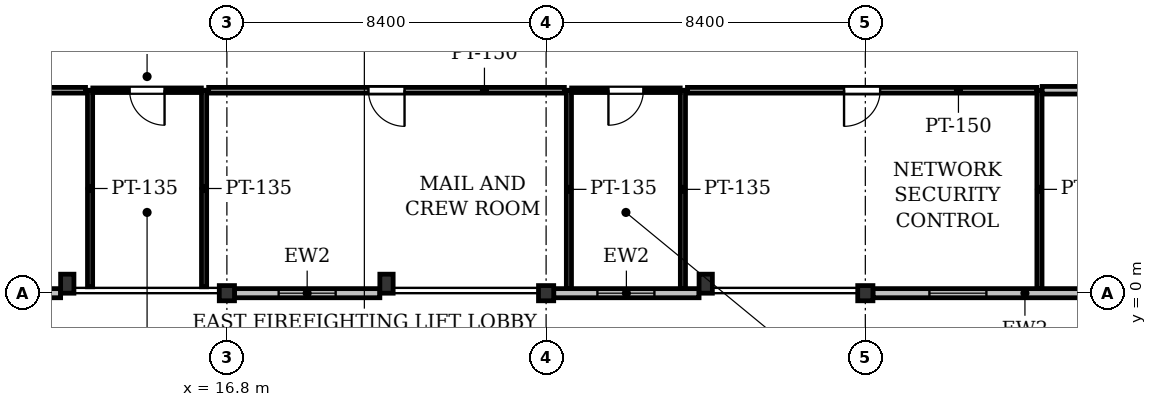
"""IFC4 building model, lengths in metres.
Left out: names, types, materials, properties, quantities, classifications, styles, units other than length and angle.
Written with IfcOpenShell. Run it as: python <this file> out.ifc"""

import sys

from ifc_helpers import new_model, si_unit, direction, frame, frame_2d, origin, origin_2d, place, context, subcontext, project, spatial, rectangle, i_section, extrude, element, fill, save


model = new_model("IFC4")
c1 = context("Model", 3, precision=1e-05, world=origin(), true_north=direction((0.0, 1.0)))
c2 = subcontext(c1, "Body", "Model", "MODEL_VIEW")
j1 = project(units=[si_unit("LENGTHUNIT", "METRE"), si_unit("PLANEANGLEUNIT", "RADIAN")], contexts=[c1])
p1 = place(None, origin())
s1 = spatial("IfcSite", under=j1, at=p1, CompositionType="ELEMENT")
p2 = place(p1, origin())
s2 = spatial("IfcBuilding", under=s1, at=p2, CompositionType="ELEMENT")
p3 = place(p2, frame((0.0, 0.0, 84.4)))
s3 = spatial("IfcBuildingStorey", under=s2, at=p3, CompositionType="ELEMENT", Elevation=84.4)
for number, where, z_axis, x_axis in (
    (1, (16.8, 0.0, 0.0), (0.0, 0.0, 1.0), (1.0, 0.0, 0.0)),
    (2, (25.2, 0.0, 0.0), (0.0, 0.0, 1.0), (1.0, 0.0, 0.0)),
    (3, (33.6, 0.0, 0.0), (0.0, 0.0, 1.0), (1.0, 0.0, 0.0)),
):
    element("IfcColumn", number, at=place(p3, frame(where, z_axis=z_axis, x_axis=x_axis)), inside=s3, PredefinedType="COLUMN", context=c2, shape_type="SweptSolid", body=[
        extrude(i_section(OverallWidth=0.4, OverallDepth=0.4, WebThickness=0.025, FlangeThickness=0.04, at=origin_2d()), origin(), (0.0, 0.0, 1.0), 4.1),
    ])
for number, where, z_axis, x_axis in (
    (4, (12.6, 0.25, 0.0), (0.0, 0.0, 1.0), (1.0, 0.0, 0.0)),
    (5, (21.0, 0.25, 0.0), (0.0, 0.0, 1.0), (1.0, 0.0, 0.0)),
    (6, (29.4, 0.25, 0.0), (0.0, 0.0, 1.0), (1.0, 0.0, 0.0)),
):
    element("IfcColumn", number, at=place(p3, frame(where, z_axis=z_axis, x_axis=x_axis)), inside=s3, PredefinedType="PILASTER", context=c2, shape_type="SweptSolid", body=[
        extrude(rectangle(XDim=0.35, YDim=0.5, at=origin_2d()), origin(), (0.0, 0.0, 1.0), 4.1),
    ])
p4 = place(p3, frame((41.8, 0.0, 0.0), z_axis=(0.0, 0.0, 1.0), x_axis=(-1.0, 0.0, 0.0)))
e7 = element("IfcWall", 7, at=p4, inside=s3, PredefinedType="STANDARD", context=c2, shape_type="SweptSolid", body=[
    extrude(rectangle(XDim=8.0, YDim=0.24, at=frame_2d((4.0, 0.0))), origin(), (0.0, 0.0, 1.0), 3.422),
])
p5 = place(p4, frame((5.014, 0.0, 0.9)))
e8 = element("IfcOpeningElement", 8, at=p5, cuts=e7, PredefinedType="OPENING", context=c2, shape_type="SweptSolid", body=[
    extrude(rectangle(XDim=1.5, YDim=1.6, at=frame_2d((0.75, 0.8))), frame((0.0, 0.13, 0.0), z_axis=(0.0, -1.0, 0.0), x_axis=(1.0, 0.0, 0.0)), (0.0, 0.0, 1.0), 0.26),
])
p6 = place(p3, frame((29.225, 0.0, 0.0), z_axis=(0.0, 0.0, 1.0), x_axis=(-1.0, 0.0, 0.0)))
e9 = element("IfcWall", 9, at=p6, inside=s3, PredefinedType="STANDARD", context=c2, shape_type="SweptSolid", body=[
    extrude(rectangle(XDim=3.825, YDim=0.24, at=frame_2d((1.913, 0.0))), origin(), (0.0, 0.0, 1.0), 3.422),
])
p7 = place(p6, frame((1.175, 0.0, 0.9)))
e10 = element("IfcOpeningElement", 10, at=p7, cuts=e9, PredefinedType="OPENING", context=c2, shape_type="SweptSolid", body=[
    extrude(rectangle(XDim=1.5, YDim=1.6, at=frame_2d((0.75, 0.8))), frame((0.0, 0.13, 0.0), z_axis=(0.0, -1.0, 0.0), x_axis=(1.0, 0.0, 0.0)), (0.0, 0.0, 1.0), 0.26),
])
p8 = place(p3, frame((20.825, 0.0, 0.0), z_axis=(0.0, 0.0, 1.0), x_axis=(-1.0, 0.0, 0.0)))
e11 = element("IfcWall", 11, at=p8, inside=s3, PredefinedType="STANDARD", context=c2, shape_type="SweptSolid", body=[
    extrude(rectangle(XDim=3.825, YDim=0.24, at=frame_2d((1.913, 0.0))), origin(), (0.0, 0.0, 1.0), 3.422),
])
p9 = place(p8, frame((1.163, 0.0, 0.9)))
e12 = element("IfcOpeningElement", 12, at=p9, cuts=e11, PredefinedType="OPENING", context=c2, shape_type="SweptSolid", body=[
    extrude(rectangle(XDim=1.5, YDim=1.6, at=frame_2d((0.75, 0.8))), frame((0.0, 0.13, 0.0), z_axis=(0.0, -1.0, 0.0), x_axis=(1.0, 0.0, 0.0)), (0.0, 0.0, 1.0), 0.26),
])
p10 = place(p3, frame((12.425, 0.0, 0.0), z_axis=(0.0, 0.0, 1.0), x_axis=(-1.0, 0.0, 0.0)))
e13 = element("IfcWall", 13, at=p10, inside=s3, PredefinedType="STANDARD", context=c2, shape_type="SweptSolid", body=[
    extrude(rectangle(XDim=3.825, YDim=0.24, at=frame_2d((1.913, 0.0))), origin(), (0.0, 0.0, 1.0), 3.422),
])
p11 = place(p10, frame((1.163, 0.0, 0.9)))
e14 = element("IfcOpeningElement", 14, at=p11, cuts=e13, PredefinedType="OPENING", context=c2, shape_type="SweptSolid", body=[
    extrude(rectangle(XDim=1.5, YDim=1.6, at=frame_2d((0.75, 0.8))), frame((0.0, 0.13, 0.0), z_axis=(0.0, -1.0, 0.0), x_axis=(1.0, 0.0, 0.0)), (0.0, 0.0, 1.0), 0.26),
])
for number, where, z_axis, x_axis in (
    (15, (13.2, 5.34, 0.0), (0.0, 0.0, 1.0), (0.0, -1.0, 0.0)),
    (16, (16.2, 0.169, 0.0), (0.0, 0.0, 1.0), (0.0, 1.0, 0.0)),
):
    element("IfcWall", number, at=place(p3, frame(where, z_axis=z_axis, x_axis=x_axis)), inside=s3, PredefinedType="PARTITIONING", context=c2, shape_type="SweptSolid", body=[
        extrude(rectangle(XDim=5.171, YDim=0.135, at=frame_2d((2.585, 0.0))), origin(), (0.0, 0.0, 1.0), 3.825),
    ])
p12 = place(p3, frame((16.128, 5.34, 0.0), z_axis=(0.0, 0.0, 1.0), x_axis=(-1.0, 0.0, 0.0)))
e17 = element("IfcWall", 17, at=p12, inside=s3, PredefinedType="PARTITIONING", context=c2, shape_type="SweptSolid", body=[
    extrude(rectangle(XDim=2.857, YDim=0.12, at=frame_2d((1.428, 0.0))), origin(), (0.0, 0.0, 1.0), 3.825),
])
p13 = place(p12, frame((0.969, 0.0, 0.0)))
e18 = element("IfcOpeningElement", 18, at=p13, cuts=e17, PredefinedType="OPENING", context=c2, shape_type="SweptSolid", body=[
    extrude(rectangle(XDim=0.92, YDim=2.1, at=frame_2d((0.46, 1.05))), frame((0.0, 0.07, 0.0), z_axis=(0.0, -1.0, 0.0), x_axis=(1.0, 0.0, 0.0)), (0.0, 0.0, 1.0), 0.14),
])
for number, where, z_axis, x_axis in (
    (19, (25.8, 5.34, 0.0), (0.0, 0.0, 1.0), (0.0, -1.0, 0.0)),
    (20, (28.8, 0.124, 0.0), (0.0, 0.0, 1.0), (0.0, 1.0, 0.0)),
):
    element("IfcWall", number, at=place(p3, frame(where, z_axis=z_axis, x_axis=x_axis)), inside=s3, PredefinedType="PARTITIONING", context=c2, shape_type="SweptSolid", body=[
        extrude(rectangle(XDim=5.216, YDim=0.135, at=frame_2d((2.608, 0.0))), origin(), (0.0, 0.0, 1.0), 3.825),
    ])
p14 = place(p3, frame((28.729, 5.34, 0.0), z_axis=(0.0, 0.0, 1.0), x_axis=(-1.0, 0.0, 0.0)))
e21 = element("IfcWall", 21, at=p14, inside=s3, PredefinedType="PARTITIONING", context=c2, shape_type="SweptSolid", body=[
    extrude(rectangle(XDim=2.857, YDim=0.12, at=frame_2d((1.428, 0.0))), origin(), (0.0, 0.0, 1.0), 3.825),
])
p15 = place(p14, frame((0.969, 0.0, 0.0)))
e22 = element("IfcOpeningElement", 22, at=p15, cuts=e21, PredefinedType="OPENING", context=c2, shape_type="SweptSolid", body=[
    extrude(rectangle(XDim=0.92, YDim=2.1, at=frame_2d((0.46, 1.05))), frame((0.0, 0.07, 0.0), z_axis=(0.0, -1.0, 0.0), x_axis=(1.0, 0.0, 0.0)), (0.0, 0.0, 1.0), 0.14),
])
p16 = place(p3, frame((38.182, 0.124, 0.0), z_axis=(0.0, 0.0, 1.0), x_axis=(0.0, 1.0, 0.0)))
e23 = element("IfcWall", 23, at=p16, inside=s3, PredefinedType="PARTITIONING", context=c2, shape_type="SweptSolid", body=[
    extrude(rectangle(XDim=5.216, YDim=0.135, at=frame_2d((2.608, 0.0))), origin(), (0.0, 0.0, 1.0), 3.825),
])
p17 = place(p3, frame((38.111, 5.34, 0.0), z_axis=(0.0, 0.0, 1.0), x_axis=(-1.0, 0.0, 0.0)))
e24 = element("IfcWall", 24, at=p17, inside=s3, PredefinedType="PARTITIONING", context=c2, shape_type="SweptSolid", body=[
    extrude(rectangle(XDim=9.191, YDim=0.15, at=frame_2d((4.595, 0.0))), origin(), (0.0, 0.0, 1.0), 3.297),
])
p18 = place(p17, frame((4.12, 0.0, 0.0)))
e25 = element("IfcOpeningElement", 25, at=p18, cuts=e24, PredefinedType="OPENING", context=c2, shape_type="SweptSolid", body=[
    extrude(rectangle(XDim=0.95, YDim=2.15, at=frame_2d((0.475, 1.075))), frame((0.0, 0.085, 0.0), z_axis=(0.0, -1.0, 0.0), x_axis=(1.0, 0.0, 0.0)), (0.0, 0.0, 1.0), 0.17),
])
p19 = place(p3, frame((25.68, 5.34, 0.0), z_axis=(0.0, 0.0, 1.0), x_axis=(-1.0, 0.0, 0.0)))
e26 = element("IfcWall", 26, at=p19, inside=s3, PredefinedType="PARTITIONING", context=c2, shape_type="SweptSolid", body=[
    extrude(rectangle(XDim=9.36, YDim=0.15, at=frame_2d((4.68, 0.0))), origin(), (0.0, 0.0, 1.0), 3.297),
])
p20 = place(p19, frame((4.205, 0.0, 0.0)))
e27 = element("IfcOpeningElement", 27, at=p20, cuts=e26, PredefinedType="OPENING", context=c2, shape_type="SweptSolid", body=[
    extrude(rectangle(XDim=0.95, YDim=2.15, at=frame_2d((0.475, 1.075))), frame((0.0, 0.085, 0.0), z_axis=(0.0, -1.0, 0.0), x_axis=(1.0, 0.0, 0.0)), (0.0, 0.0, 1.0), 0.17),
])
p21 = place(p3, frame((45.2, 5.34, 0.0), z_axis=(0.0, 0.0, 1.0), x_axis=(-1.0, 0.0, 0.0)))
e28 = element("IfcWall", 28, at=p21, inside=s3, PredefinedType="PARTITIONING", context=c2, shape_type="SweptSolid", body=[
    extrude(rectangle(XDim=6.947, YDim=0.2, at=frame_2d((3.473, 0.0))), origin(), (0.0, 0.0, 1.0), 3.297),
])
p22 = place(p3, frame((13.08, 5.34, 0.0), z_axis=(0.0, 0.0, 1.0), x_axis=(-1.0, 0.0, 0.0)))
e29 = element("IfcWall", 29, at=p22, inside=s3, PredefinedType="PARTITIONING", context=c2, shape_type="SweptSolid", body=[
    extrude(rectangle(XDim=7.68, YDim=0.15, at=frame_2d((3.84, 0.0))), origin(), (0.0, 0.0, 1.0), 3.297),
])
p23 = place(p5, origin())
e30 = element("IfcWindow", 30, at=p23, inside=s3, PartitioningType="SINGLE_PANEL", PredefinedType="WINDOW", context=c2, shape_type="SweptSolid", body=[
    extrude(rectangle(XDim=1.5, YDim=1.6, at=frame_2d((0.75, 0.8))), frame((0.0, 0.03, 0.0), z_axis=(0.0, -1.0, 0.0), x_axis=(1.0, 0.0, 0.0)), (0.0, 0.0, 1.0), 0.06),
])
fill(e8, e30)
p24 = place(p7, origin())
e31 = element("IfcWindow", 31, at=p24, inside=s3, PartitioningType="SINGLE_PANEL", PredefinedType="WINDOW", context=c2, shape_type="SweptSolid", body=[
    extrude(rectangle(XDim=1.5, YDim=1.6, at=frame_2d((0.75, 0.8))), frame((0.0, 0.03, 0.0), z_axis=(0.0, -1.0, 0.0), x_axis=(1.0, 0.0, 0.0)), (0.0, 0.0, 1.0), 0.06),
])
fill(e10, e31)
p25 = place(p9, origin())
e32 = element("IfcWindow", 32, at=p25, inside=s3, PartitioningType="SINGLE_PANEL", PredefinedType="WINDOW", context=c2, shape_type="SweptSolid", body=[
    extrude(rectangle(XDim=1.5, YDim=1.6, at=frame_2d((0.75, 0.8))), frame((0.0, 0.03, 0.0), z_axis=(0.0, -1.0, 0.0), x_axis=(1.0, 0.0, 0.0)), (0.0, 0.0, 1.0), 0.06),
])
fill(e12, e32)
p26 = place(p13, origin())
e33 = element("IfcDoor", 33, at=p26, inside=s3, OperationType="SINGLE_SWING_LEFT", PredefinedType="DOOR", context=c2, shape_type="SweptSolid", body=[
    extrude(rectangle(XDim=0.92, YDim=2.1, at=frame_2d((0.46, 1.05))), frame((0.0, 0.025, 0.0), z_axis=(0.0, -1.0, 0.0), x_axis=(1.0, 0.0, 0.0)), (0.0, 0.0, 1.0), 0.05),
])
fill(e18, e33)
p27 = place(p15, origin())
e34 = element("IfcDoor", 34, at=p27, inside=s3, OperationType="SINGLE_SWING_RIGHT", PredefinedType="DOOR", context=c2, shape_type="SweptSolid", body=[
    extrude(rectangle(XDim=0.92, YDim=2.1, at=frame_2d((0.46, 1.05))), frame((0.0, 0.025, 0.0), z_axis=(0.0, -1.0, 0.0), x_axis=(1.0, 0.0, 0.0)), (0.0, 0.0, 1.0), 0.05),
])
fill(e22, e34)
p28 = place(p18, origin())
e35 = element("IfcDoor", 35, at=p28, inside=s3, OperationType="SINGLE_SWING_RIGHT", PredefinedType="DOOR", context=c2, shape_type="SweptSolid", body=[
    extrude(rectangle(XDim=0.95, YDim=2.15, at=frame_2d((0.475, 1.075))), frame((0.0, 0.025, 0.0), z_axis=(0.0, -1.0, 0.0), x_axis=(1.0, 0.0, 0.0)), (0.0, 0.0, 1.0), 0.05),
])
fill(e25, e35)
p29 = place(p20, origin())
e36 = element("IfcDoor", 36, at=p29, inside=s3, OperationType="SINGLE_SWING_LEFT", PredefinedType="DOOR", context=c2, shape_type="SweptSolid", body=[
    extrude(rectangle(XDim=0.95, YDim=2.15, at=frame_2d((0.475, 1.075))), frame((0.0, 0.025, 0.0), z_axis=(0.0, -1.0, 0.0), x_axis=(1.0, 0.0, 0.0)), (0.0, 0.0, 1.0), 0.05),
])
fill(e27, e36)
save(model, sys.argv[1])
